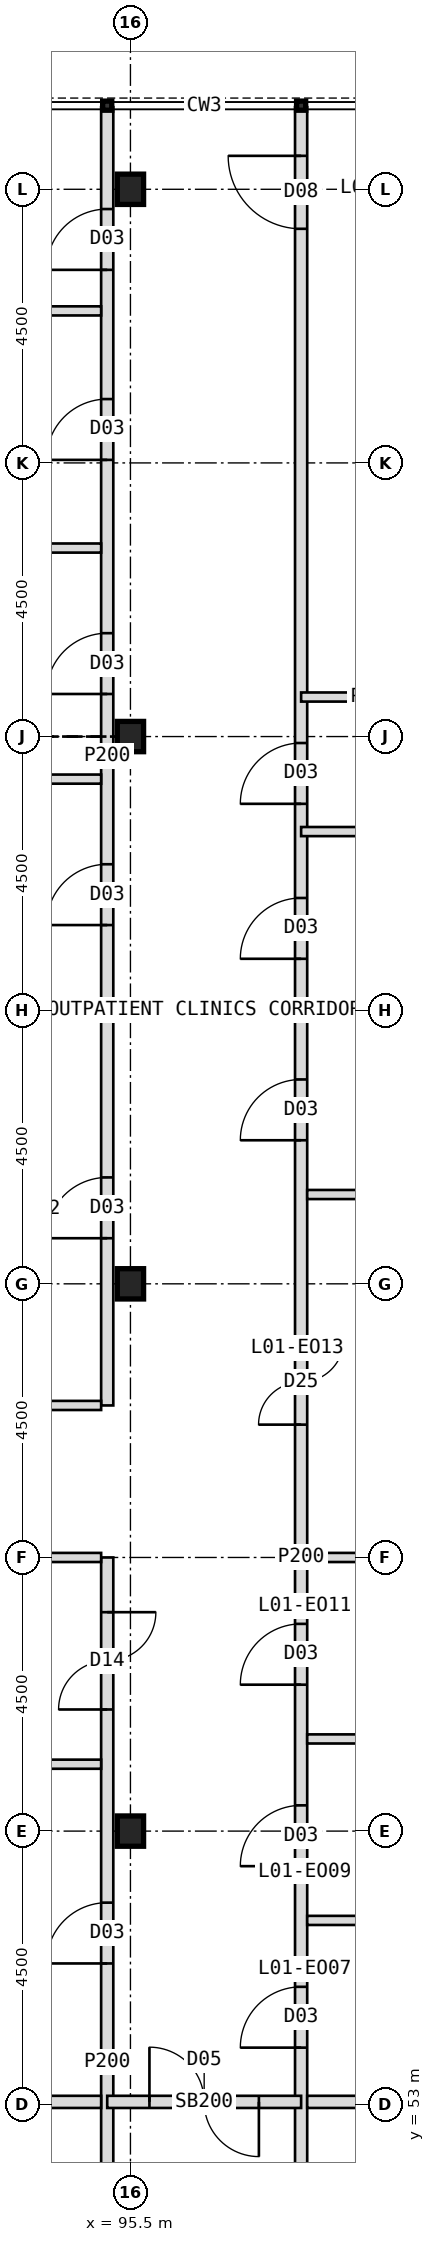
"""IFC4 building model, lengths in metres.
Left out: names, types, materials, properties, quantities, classifications, styles, units other than length and angle.
Written with IfcOpenShell. Run it as: python <this file> out.ifc"""

import sys

from ifc_helpers import new_model, si_unit, direction, frame, frame_2d, origin, origin_2d, place, context, subcontext, project, spatial, rectangle, i_section, extrude, element, fill, save


model = new_model("IFC4")
c1 = context("Model", 3, precision=1e-05, world=origin(), true_north=direction((0.0, 1.0)))
c2 = subcontext(c1, "Body", "Model", "MODEL_VIEW")
j1 = project(units=[si_unit("LENGTHUNIT", "METRE"), si_unit("PLANEANGLEUNIT", "RADIAN")], contexts=[c1])
p1 = place(None, origin())
s1 = spatial("IfcSite", under=j1, at=p1, CompositionType="ELEMENT")
p2 = place(p1, origin())
s2 = spatial("IfcBuilding", under=s1, at=p2, CompositionType="ELEMENT")
p3 = place(p2, frame((0.0, 0.0, 6.0)))
s3 = spatial("IfcBuildingStorey", under=s2, at=p3, CompositionType="ELEMENT", Elevation=6.0)
for number, where, z_axis, x_axis in (
    (1, (95.5, 57.5, 0.0), (0.0, 0.0, 1.0), (1.0, 0.0, 0.0)),
    (2, (95.5, 66.5, 0.0), (0.0, 0.0, 1.0), (1.0, 0.0, 0.0)),
    (3, (95.5, 75.5, 0.0), (0.0, 0.0, 1.0), (1.0, 0.0, 0.0)),
    (4, (95.5, 84.5, 0.0), (0.0, 0.0, 1.0), (1.0, 0.0, 0.0)),
):
    element("IfcColumn", number, at=place(p3, frame(where, z_axis=z_axis, x_axis=x_axis)), inside=s3, PredefinedType="COLUMN", context=c2, shape_type="SweptSolid", body=[
        extrude(i_section(OverallWidth=0.432, OverallDepth=0.498, WebThickness=0.056, FlangeThickness=0.089, FilletRadius=0.015, at=origin_2d()), origin(), (0.0, 0.0, 1.0), 5.0),
    ])
p4 = place(p3, frame((98.307, 38.15, 0.0), z_axis=(0.0, 0.0, 1.0), x_axis=(0.0, 1.0, 0.0)))
e5 = element("IfcWall", 5, at=p4, inside=s3, PredefinedType="PARTITIONING", context=c2, shape_type="SweptSolid", body=[
    extrude(rectangle(XDim=47.7, YDim=0.2, at=frame_2d((23.85, 0.0))), origin(), (0.0, 0.0, 1.0), 4.7),
])
p5 = place(p4, frame((45.7, 0.0, 0.0)))
e6 = element("IfcOpeningElement", 6, at=p5, cuts=e5, PredefinedType="OPENING", context=c2, shape_type="SweptSolid", body=[
    extrude(rectangle(XDim=1.2, YDim=2.1, at=frame_2d((0.6, 1.05))), frame((0.0, 0.11, 0.0), z_axis=(0.0, -1.0, 0.0), x_axis=(1.0, 0.0, 0.0)), (0.0, 0.0, 1.0), 0.22),
])
p6 = place(p4, frame((36.244, 0.0, 0.0)))
e7 = element("IfcOpeningElement", 7, at=p6, cuts=e5, PredefinedType="OPENING", context=c2, shape_type="SweptSolid", body=[
    extrude(rectangle(XDim=1.0, YDim=2.1, at=frame_2d((0.5, 1.05))), frame((0.0, 0.11, 0.0), z_axis=(0.0, -1.0, 0.0), x_axis=(1.0, 0.0, 0.0)), (0.0, 0.0, 1.0), 0.22),
])
p7 = place(p4, frame((0.93, 0.0, 0.0)))
e8 = element("IfcOpeningElement", 8, at=p7, cuts=e5, PredefinedType="OPENING", context=c2, shape_type="SweptSolid", body=[
    extrude(rectangle(XDim=1.0, YDim=2.1, at=frame_2d((0.5, 1.05))), frame((0.0, 0.11, 0.0), z_axis=(0.0, -1.0, 0.0), x_axis=(1.0, 0.0, 0.0)), (0.0, 0.0, 1.0), 0.22),
])
p8 = place(p4, frame((3.852, 0.0, 0.0)))
e9 = element("IfcOpeningElement", 9, at=p8, cuts=e5, PredefinedType="OPENING", context=c2, shape_type="SweptSolid", body=[
    extrude(rectangle(XDim=1.0, YDim=2.1, at=frame_2d((0.5, 1.05))), frame((0.0, 0.11, 0.0), z_axis=(0.0, -1.0, 0.0), x_axis=(1.0, 0.0, 0.0)), (0.0, 0.0, 1.0), 0.22),
])
p9 = place(p4, frame((6.836, 0.0, 0.0)))
e10 = element("IfcOpeningElement", 10, at=p9, cuts=e5, PredefinedType="OPENING", context=c2, shape_type="SweptSolid", body=[
    extrude(rectangle(XDim=1.0, YDim=2.1, at=frame_2d((0.5, 1.05))), frame((0.0, 0.11, 0.0), z_axis=(0.0, -1.0, 0.0), x_axis=(1.0, 0.0, 0.0)), (0.0, 0.0, 1.0), 0.22),
])
p10 = place(p4, frame((11.012, 0.0, 0.0)))
e11 = element("IfcOpeningElement", 11, at=p10, cuts=e5, PredefinedType="OPENING", context=c2, shape_type="SweptSolid", body=[
    extrude(rectangle(XDim=1.6, YDim=2.2, at=frame_2d((0.8, 1.1))), frame((0.0, 0.11, 0.0), z_axis=(0.0, -1.0, 0.0), x_axis=(1.0, 0.0, 0.0)), (0.0, 0.0, 1.0), 0.22),
])
p11 = place(p4, frame((15.789, 0.0, 0.0)))
e12 = element("IfcOpeningElement", 12, at=p11, cuts=e5, PredefinedType="OPENING", context=c2, shape_type="SweptSolid", body=[
    extrude(rectangle(XDim=1.0, YDim=2.1, at=frame_2d((0.5, 1.05))), frame((0.0, 0.11, 0.0), z_axis=(0.0, -1.0, 0.0), x_axis=(1.0, 0.0, 0.0)), (0.0, 0.0, 1.0), 0.22),
])
p12 = place(p4, frame((18.773, 0.0, 0.0)))
e13 = element("IfcOpeningElement", 13, at=p12, cuts=e5, PredefinedType="OPENING", context=c2, shape_type="SweptSolid", body=[
    extrude(rectangle(XDim=1.0, YDim=2.1, at=frame_2d((0.5, 1.05))), frame((0.0, 0.11, 0.0), z_axis=(0.0, -1.0, 0.0), x_axis=(1.0, 0.0, 0.0)), (0.0, 0.0, 1.0), 0.22),
])
p13 = place(p4, frame((21.758, 0.0, 0.0)))
e14 = element("IfcOpeningElement", 14, at=p13, cuts=e5, PredefinedType="OPENING", context=c2, shape_type="SweptSolid", body=[
    extrude(rectangle(XDim=1.0, YDim=2.1, at=frame_2d((0.5, 1.05))), frame((0.0, 0.11, 0.0), z_axis=(0.0, -1.0, 0.0), x_axis=(1.0, 0.0, 0.0)), (0.0, 0.0, 1.0), 0.22),
])
p14 = place(p4, frame((26.034, 0.0, 0.0)))
e15 = element("IfcOpeningElement", 15, at=p14, cuts=e5, PredefinedType="OPENING", context=c2, shape_type="SweptSolid", body=[
    extrude(rectangle(XDim=1.4, YDim=2.2, at=frame_2d((0.7, 1.1))), frame((0.0, 0.11, 0.0), z_axis=(0.0, -1.0, 0.0), x_axis=(1.0, 0.0, 0.0)), (0.0, 0.0, 1.0), 0.22),
])
p15 = place(p4, frame((30.711, 0.0, 0.0)))
e16 = element("IfcOpeningElement", 16, at=p15, cuts=e5, PredefinedType="OPENING", context=c2, shape_type="SweptSolid", body=[
    extrude(rectangle(XDim=1.0, YDim=2.1, at=frame_2d((0.5, 1.05))), frame((0.0, 0.11, 0.0), z_axis=(0.0, -1.0, 0.0), x_axis=(1.0, 0.0, 0.0)), (0.0, 0.0, 1.0), 0.22),
])
p16 = place(p4, frame((33.695, 0.0, 0.0)))
e17 = element("IfcOpeningElement", 17, at=p16, cuts=e5, PredefinedType="OPENING", context=c2, shape_type="SweptSolid", body=[
    extrude(rectangle(XDim=1.0, YDim=2.1, at=frame_2d((0.5, 1.05))), frame((0.0, 0.11, 0.0), z_axis=(0.0, -1.0, 0.0), x_axis=(1.0, 0.0, 0.0)), (0.0, 0.0, 1.0), 0.22),
])
p17 = place(p3, frame((95.118, 45.4, 0.0), z_axis=(0.0, 0.0, 1.0), x_axis=(0.0, 1.0, 0.0)))
e18 = element("IfcWall", 18, at=p17, inside=s3, PredefinedType="PARTITIONING", context=c2, shape_type="SweptSolid", body=[
    extrude(rectangle(XDim=16.6, YDim=0.2, at=frame_2d((8.3, 0.0))), origin(), (0.0, 0.0, 1.0), 4.7),
])
p18 = place(p17, frame((1.65, 0.0, 0.0)))
e19 = element("IfcOpeningElement", 19, at=p18, cuts=e18, PredefinedType="OPENING", context=c2, shape_type="SweptSolid", body=[
    extrude(rectangle(XDim=1.0, YDim=2.1, at=frame_2d((0.5, 1.05))), frame((0.0, 0.11, 0.0), z_axis=(0.0, -1.0, 0.0), x_axis=(1.0, 0.0, 0.0)), (0.0, 0.0, 1.0), 0.22),
])
p19 = place(p17, frame((5.473, 0.0, 0.0)))
e20 = element("IfcOpeningElement", 20, at=p19, cuts=e18, PredefinedType="OPENING", context=c2, shape_type="SweptSolid", body=[
    extrude(rectangle(XDim=1.0, YDim=2.1, at=frame_2d((0.5, 1.05))), frame((0.0, 0.11, 0.0), z_axis=(0.0, -1.0, 0.0), x_axis=(1.0, 0.0, 0.0)), (0.0, 0.0, 1.0), 0.22),
])
p20 = place(p17, frame((9.924, 0.0, 0.0)))
e21 = element("IfcOpeningElement", 21, at=p20, cuts=e18, PredefinedType="OPENING", context=c2, shape_type="SweptSolid", body=[
    extrude(rectangle(XDim=1.0, YDim=2.1, at=frame_2d((0.5, 1.05))), frame((0.0, 0.11, 0.0), z_axis=(0.0, -1.0, 0.0), x_axis=(1.0, 0.0, 0.0)), (0.0, 0.0, 1.0), 0.22),
])
p21 = place(p17, frame((14.1, 0.0, 0.0)))
e22 = element("IfcOpeningElement", 22, at=p21, cuts=e18, PredefinedType="OPENING", context=c2, shape_type="SweptSolid", body=[
    extrude(rectangle(XDim=1.6, YDim=2.2, at=frame_2d((0.8, 1.1))), frame((0.0, 0.11, 0.0), z_axis=(0.0, -1.0, 0.0), x_axis=(1.0, 0.0, 0.0)), (0.0, 0.0, 1.0), 0.22),
])
p22 = place(p3, frame((95.118, 64.5, 0.0), z_axis=(0.0, 0.0, 1.0), x_axis=(0.0, 1.0, 0.0)))
e23 = element("IfcWall", 23, at=p22, inside=s3, PredefinedType="PARTITIONING", context=c2, shape_type="SweptSolid", body=[
    extrude(rectangle(XDim=21.35, YDim=0.2, at=frame_2d((10.675, 0.0))), origin(), (0.0, 0.0, 1.0), 4.7),
])
p23 = place(p22, frame((2.75, 0.0, 0.0)))
e24 = element("IfcOpeningElement", 24, at=p23, cuts=e23, PredefinedType="OPENING", context=c2, shape_type="SweptSolid", body=[
    extrude(rectangle(XDim=1.0, YDim=2.1, at=frame_2d((0.5, 1.05))), frame((0.0, 0.11, 0.0), z_axis=(0.0, -1.0, 0.0), x_axis=(1.0, 0.0, 0.0)), (0.0, 0.0, 1.0), 0.22),
])
p24 = place(p22, frame((7.9, 0.0, 0.0)))
e25 = element("IfcOpeningElement", 25, at=p24, cuts=e23, PredefinedType="OPENING", context=c2, shape_type="SweptSolid", body=[
    extrude(rectangle(XDim=1.0, YDim=2.1, at=frame_2d((0.5, 1.05))), frame((0.0, 0.11, 0.0), z_axis=(0.0, -1.0, 0.0), x_axis=(1.0, 0.0, 0.0)), (0.0, 0.0, 1.0), 0.22),
])
p25 = place(p22, frame((11.7, 0.0, 0.0)))
e26 = element("IfcOpeningElement", 26, at=p25, cuts=e23, PredefinedType="OPENING", context=c2, shape_type="SweptSolid", body=[
    extrude(rectangle(XDim=1.0, YDim=2.1, at=frame_2d((0.5, 1.05))), frame((0.0, 0.11, 0.0), z_axis=(0.0, -1.0, 0.0), x_axis=(1.0, 0.0, 0.0)), (0.0, 0.0, 1.0), 0.22),
])
p26 = place(p22, frame((15.55, 0.0, 0.0)))
e27 = element("IfcOpeningElement", 27, at=p26, cuts=e23, PredefinedType="OPENING", context=c2, shape_type="SweptSolid", body=[
    extrude(rectangle(XDim=1.0, YDim=2.1, at=frame_2d((0.5, 1.05))), frame((0.0, 0.11, 0.0), z_axis=(0.0, -1.0, 0.0), x_axis=(1.0, 0.0, 0.0)), (0.0, 0.0, 1.0), 0.22),
])
p27 = place(p22, frame((18.675, 0.0, 0.0)))
e28 = element("IfcOpeningElement", 28, at=p27, cuts=e23, PredefinedType="OPENING", context=c2, shape_type="SweptSolid", body=[
    extrude(rectangle(XDim=1.0, YDim=2.1, at=frame_2d((0.5, 1.05))), frame((0.0, 0.11, 0.0), z_axis=(0.0, -1.0, 0.0), x_axis=(1.0, 0.0, 0.0)), (0.0, 0.0, 1.0), 0.22),
])
p28 = place(p3, frame((98.307, 53.047, 0.0), z_axis=(0.0, 0.0, 1.0), x_axis=(-1.0, 0.0, 0.0)))
e29 = element("IfcWall", 29, at=p28, inside=s3, PredefinedType="SOLIDWALL", context=c2, shape_type="SweptSolid", body=[
    extrude(rectangle(XDim=3.189, YDim=0.2, at=frame_2d((1.594, 0.0))), origin(), (0.0, 0.0, 1.0), 4.7),
])
p29 = place(p28, frame((0.695, 0.0, 0.0)))
e30 = element("IfcOpeningElement", 30, at=p29, cuts=e29, PredefinedType="OPENING", context=c2, shape_type="SweptSolid", body=[
    extrude(rectangle(XDim=1.8, YDim=2.2, at=frame_2d((0.9, 1.1))), frame((0.0, 0.11, 0.0), z_axis=(0.0, -1.0, 0.0), x_axis=(1.0, 0.0, 0.0)), (0.0, 0.0, 1.0), 0.22),
])
p30 = place(p3, frame((100.7, 76.15, 0.0), z_axis=(0.0, 0.0, 1.0), x_axis=(-1.0, 0.0, 0.0)))
e31 = element("IfcWall", 31, at=p30, inside=s3, PredefinedType="PARTITIONING", context=c2, shape_type="SweptSolid", body=[
    extrude(rectangle(XDim=2.393, YDim=0.15, at=frame_2d((1.197, 0.0))), origin(), (0.0, 0.0, 1.0), 4.7),
])
p31 = place(p3, frame((107.85, 73.938, 0.0), z_axis=(0.0, 0.0, 1.0), x_axis=(-1.0, 0.0, 0.0)))
e32 = element("IfcWall", 32, at=p31, inside=s3, PredefinedType="PARTITIONING", context=c2, shape_type="SweptSolid", body=[
    extrude(rectangle(XDim=9.543, YDim=0.15, at=frame_2d((4.771, 0.0))), origin(), (0.0, 0.0, 1.0), 4.7),
])
p32 = place(p3, frame((107.85, 53.047, 0.0), z_axis=(0.0, 0.0, 1.0), x_axis=(-1.0, 0.0, 0.0)))
e33 = element("IfcWall", 33, at=p32, inside=s3, PredefinedType="SOLIDWALL", context=c2, shape_type="SweptSolid", body=[
    extrude(rectangle(XDim=9.443, YDim=0.2, at=frame_2d((4.722, 0.0))), origin(), (0.0, 0.0, 1.0), 4.7),
])
for number, where, z_axis, x_axis in (
    (34, (107.85, 56.031, 0.0), (0.0, 0.0, 1.0), (-1.0, 0.0, 0.0)),
    (35, (107.85, 59.016, 0.0), (0.0, 0.0, 1.0), (-1.0, 0.0, 0.0)),
    (36, (107.85, 62.0, 0.0), (0.0, 0.0, 1.0), (-1.0, 0.0, 0.0)),
    (37, (107.85, 67.969, 0.0), (0.0, 0.0, 1.0), (-1.0, 0.0, 0.0)),
    (38, (107.85, 70.953, 0.0), (0.0, 0.0, 1.0), (-1.0, 0.0, 0.0)),
):
    element("IfcWall", number, at=place(p3, frame(where, z_axis=z_axis, x_axis=x_axis)), inside=s3, PredefinedType="PARTITIONING", context=c2, shape_type="SweptSolid", body=[
        extrude(rectangle(XDim=9.443, YDim=0.15, at=frame_2d((4.722, 0.0))), origin(), (0.0, 0.0, 1.0), 4.7),
    ])
p33 = place(p3, frame((95.018, 53.047, 0.0), z_axis=(0.0, 0.0, 1.0), x_axis=(-1.0, 0.0, 0.0)))
e39 = element("IfcWall", 39, at=p33, inside=s3, PredefinedType="SOLIDWALL", context=c2, shape_type="SweptSolid", body=[
    extrude(rectangle(XDim=9.168, YDim=0.2, at=frame_2d((4.584, 0.0))), origin(), (0.0, 0.0, 1.0), 4.7),
])
for number, where, z_axis, x_axis in (
    (40, (95.018, 58.6, 0.0), (0.0, 0.0, 1.0), (-1.0, 0.0, 0.0)),
    (41, (95.018, 62.0, 0.0), (0.0, 0.0, 1.0), (-1.0, 0.0, 0.0)),
    (42, (95.018, 64.5, 0.0), (0.0, 0.0, 1.0), (-1.0, 0.0, 0.0)),
    (43, (95.018, 71.0, 0.0), (0.0, 0.0, 1.0), (-1.0, 0.0, 0.0)),
    (44, (95.018, 74.8, 0.0), (0.0, 0.0, 1.0), (-1.0, 0.0, 0.0)),
    (45, (95.018, 78.6, 0.0), (0.0, 0.0, 1.0), (-1.0, 0.0, 0.0)),
    (46, (95.018, 82.5, 0.0), (0.0, 0.0, 1.0), (-1.0, 0.0, 0.0)),
):
    element("IfcWall", number, at=place(p3, frame(where, z_axis=z_axis, x_axis=x_axis)), inside=s3, PredefinedType="PARTITIONING", context=c2, shape_type="SweptSolid", body=[
        extrude(rectangle(XDim=9.168, YDim=0.15, at=frame_2d((4.584, 0.0))), origin(), (0.0, 0.0, 1.0), 4.7),
    ])
p34 = place(p29, origin())
e47 = element("IfcDoor", 47, at=p34, inside=s3, OperationType="DOUBLE_DOOR_DOUBLE_SWING", PredefinedType="DOOR", context=c2, shape_type="SweptSolid", body=[
    extrude(rectangle(XDim=1.8, YDim=2.2, at=frame_2d((0.9, 1.1))), frame((0.0, 0.025, 0.0), z_axis=(0.0, -1.0, 0.0), x_axis=(1.0, 0.0, 0.0)), (0.0, 0.0, 1.0), 0.05),
])
fill(e30, e47)
p35 = place(p5, origin())
e48 = element("IfcDoor", 48, at=p35, inside=s3, OperationType="SINGLE_SWING_RIGHT", PredefinedType="DOOR", context=c2, shape_type="SweptSolid", body=[
    extrude(rectangle(XDim=1.2, YDim=2.1, at=frame_2d((0.6, 1.05))), frame((0.0, 0.025, 0.0), z_axis=(0.0, -1.0, 0.0), x_axis=(1.0, 0.0, 0.0)), (0.0, 0.0, 1.0), 0.05),
])
fill(e6, e48)
p36 = place(p6, origin())
e49 = element("IfcDoor", 49, at=p36, inside=s3, OperationType="SINGLE_SWING_LEFT", PredefinedType="DOOR", context=c2, shape_type="SweptSolid", body=[
    extrude(rectangle(XDim=1.0, YDim=2.1, at=frame_2d((0.5, 1.05))), frame((0.0, 0.025, 0.0), z_axis=(0.0, -1.0, 0.0), x_axis=(1.0, 0.0, 0.0)), (0.0, 0.0, 1.0), 0.05),
])
fill(e7, e49)
p37 = place(p11, origin())
e50 = element("IfcDoor", 50, at=p37, inside=s3, OperationType="SINGLE_SWING_LEFT", PredefinedType="DOOR", context=c2, shape_type="SweptSolid", body=[
    extrude(rectangle(XDim=1.0, YDim=2.1, at=frame_2d((0.5, 1.05))), frame((0.0, 0.025, 0.0), z_axis=(0.0, -1.0, 0.0), x_axis=(1.0, 0.0, 0.0)), (0.0, 0.0, 1.0), 0.05),
])
fill(e12, e50)
p38 = place(p12, origin())
e51 = element("IfcDoor", 51, at=p38, inside=s3, OperationType="SINGLE_SWING_LEFT", PredefinedType="DOOR", context=c2, shape_type="SweptSolid", body=[
    extrude(rectangle(XDim=1.0, YDim=2.1, at=frame_2d((0.5, 1.05))), frame((0.0, 0.025, 0.0), z_axis=(0.0, -1.0, 0.0), x_axis=(1.0, 0.0, 0.0)), (0.0, 0.0, 1.0), 0.05),
])
fill(e13, e51)
p39 = place(p13, origin())
e52 = element("IfcDoor", 52, at=p39, inside=s3, OperationType="SINGLE_SWING_LEFT", PredefinedType="DOOR", context=c2, shape_type="SweptSolid", body=[
    extrude(rectangle(XDim=1.0, YDim=2.1, at=frame_2d((0.5, 1.05))), frame((0.0, 0.025, 0.0), z_axis=(0.0, -1.0, 0.0), x_axis=(1.0, 0.0, 0.0)), (0.0, 0.0, 1.0), 0.05),
])
fill(e14, e52)
p40 = place(p14, origin())
e53 = element("IfcDoor", 53, at=p40, inside=s3, OperationType="DOUBLE_DOOR_SINGLE_SWING", PredefinedType="DOOR", context=c2, shape_type="SweptSolid", body=[
    extrude(rectangle(XDim=1.4, YDim=2.2, at=frame_2d((0.7, 1.1))), frame((0.0, 0.025, 0.0), z_axis=(0.0, -1.0, 0.0), x_axis=(1.0, 0.0, 0.0)), (0.0, 0.0, 1.0), 0.05),
])
fill(e15, e53)
p41 = place(p15, origin())
e54 = element("IfcDoor", 54, at=p41, inside=s3, OperationType="SINGLE_SWING_LEFT", PredefinedType="DOOR", context=c2, shape_type="SweptSolid", body=[
    extrude(rectangle(XDim=1.0, YDim=2.1, at=frame_2d((0.5, 1.05))), frame((0.0, 0.025, 0.0), z_axis=(0.0, -1.0, 0.0), x_axis=(1.0, 0.0, 0.0)), (0.0, 0.0, 1.0), 0.05),
])
fill(e16, e54)
p42 = place(p16, origin())
e55 = element("IfcDoor", 55, at=p42, inside=s3, OperationType="SINGLE_SWING_LEFT", PredefinedType="DOOR", context=c2, shape_type="SweptSolid", body=[
    extrude(rectangle(XDim=1.0, YDim=2.1, at=frame_2d((0.5, 1.05))), frame((0.0, 0.025, 0.0), z_axis=(0.0, -1.0, 0.0), x_axis=(1.0, 0.0, 0.0)), (0.0, 0.0, 1.0), 0.05),
])
fill(e17, e55)
p43 = place(p20, origin())
e56 = element("IfcDoor", 56, at=p43, inside=s3, OperationType="SINGLE_SWING_LEFT", PredefinedType="DOOR", context=c2, shape_type="SweptSolid", body=[
    extrude(rectangle(XDim=1.0, YDim=2.1, at=frame_2d((0.5, 1.05))), frame((0.0, 0.025, 0.0), z_axis=(0.0, -1.0, 0.0), x_axis=(1.0, 0.0, 0.0)), (0.0, 0.0, 1.0), 0.05),
])
fill(e21, e56)
p44 = place(p21, origin())
e57 = element("IfcDoor", 57, at=p44, inside=s3, OperationType="DOUBLE_DOOR_DOUBLE_SWING", PredefinedType="DOOR", context=c2, shape_type="SweptSolid", body=[
    extrude(rectangle(XDim=1.6, YDim=2.2, at=frame_2d((0.8, 1.1))), frame((0.0, 0.025, 0.0), z_axis=(0.0, -1.0, 0.0), x_axis=(1.0, 0.0, 0.0)), (0.0, 0.0, 1.0), 0.05),
])
fill(e22, e57)
p45 = place(p23, origin())
e58 = element("IfcDoor", 58, at=p45, inside=s3, OperationType="SINGLE_SWING_LEFT", PredefinedType="DOOR", context=c2, shape_type="SweptSolid", body=[
    extrude(rectangle(XDim=1.0, YDim=2.1, at=frame_2d((0.5, 1.05))), frame((0.0, 0.025, 0.0), z_axis=(0.0, -1.0, 0.0), x_axis=(1.0, 0.0, 0.0)), (0.0, 0.0, 1.0), 0.05),
])
fill(e24, e58)
p46 = place(p24, origin())
e59 = element("IfcDoor", 59, at=p46, inside=s3, OperationType="SINGLE_SWING_LEFT", PredefinedType="DOOR", context=c2, shape_type="SweptSolid", body=[
    extrude(rectangle(XDim=1.0, YDim=2.1, at=frame_2d((0.5, 1.05))), frame((0.0, 0.025, 0.0), z_axis=(0.0, -1.0, 0.0), x_axis=(1.0, 0.0, 0.0)), (0.0, 0.0, 1.0), 0.05),
])
fill(e25, e59)
p47 = place(p25, origin())
e60 = element("IfcDoor", 60, at=p47, inside=s3, OperationType="SINGLE_SWING_LEFT", PredefinedType="DOOR", context=c2, shape_type="SweptSolid", body=[
    extrude(rectangle(XDim=1.0, YDim=2.1, at=frame_2d((0.5, 1.05))), frame((0.0, 0.025, 0.0), z_axis=(0.0, -1.0, 0.0), x_axis=(1.0, 0.0, 0.0)), (0.0, 0.0, 1.0), 0.05),
])
fill(e26, e60)
p48 = place(p26, origin())
e61 = element("IfcDoor", 61, at=p48, inside=s3, OperationType="SINGLE_SWING_LEFT", PredefinedType="DOOR", context=c2, shape_type="SweptSolid", body=[
    extrude(rectangle(XDim=1.0, YDim=2.1, at=frame_2d((0.5, 1.05))), frame((0.0, 0.025, 0.0), z_axis=(0.0, -1.0, 0.0), x_axis=(1.0, 0.0, 0.0)), (0.0, 0.0, 1.0), 0.05),
])
fill(e27, e61)
p49 = place(p27, origin())
e62 = element("IfcDoor", 62, at=p49, inside=s3, OperationType="SINGLE_SWING_LEFT", PredefinedType="DOOR", context=c2, shape_type="SweptSolid", body=[
    extrude(rectangle(XDim=1.0, YDim=2.1, at=frame_2d((0.5, 1.05))), frame((0.0, 0.025, 0.0), z_axis=(0.0, -1.0, 0.0), x_axis=(1.0, 0.0, 0.0)), (0.0, 0.0, 1.0), 0.05),
])
fill(e28, e62)
save(model, sys.argv[1])
